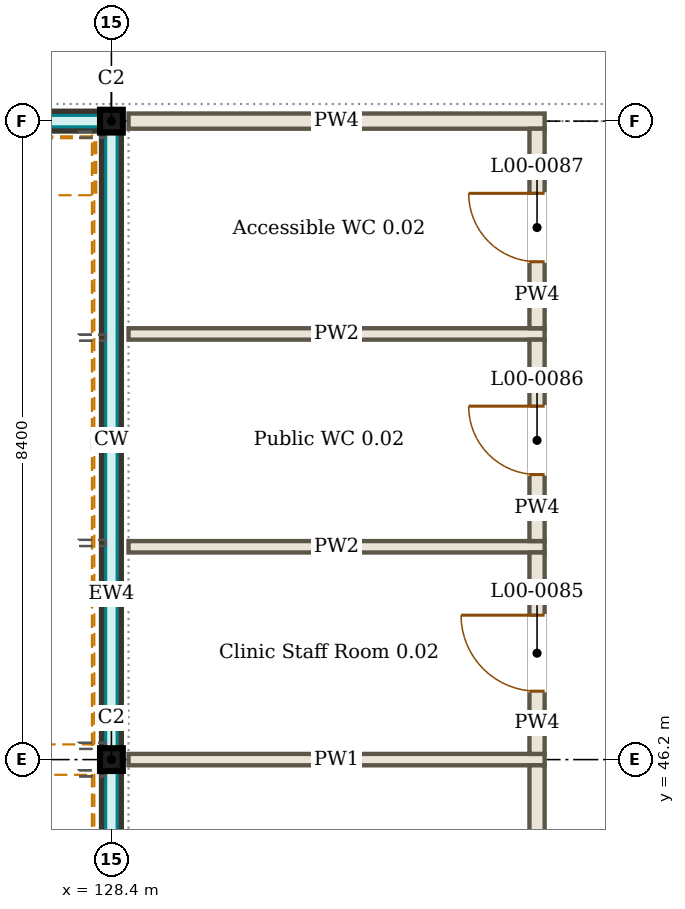
"""IFC4 building model, lengths in metres.
Left out: names, types, materials, properties, quantities, classifications, styles, units other than length and angle.
Written with IfcOpenShell. Run it as: python <this file> out.ifc"""

import sys

from ifc_helpers import new_model, si_unit, direction, frame, frame_2d, origin, origin_2d, place, context, subcontext, project, spatial, rectangle, i_section, extrude, element, fill, save


model = new_model("IFC4")
c1 = context("Model", 3, precision=1e-05, world=origin(), true_north=direction((0.0, 1.0)))
c2 = subcontext(c1, "Body", "Model", "MODEL_VIEW")
j1 = project(units=[si_unit("LENGTHUNIT", "METRE"), si_unit("PLANEANGLEUNIT", "RADIAN")], contexts=[c1])
p1 = place(None, origin())
s1 = spatial("IfcSite", under=j1, at=p1, CompositionType="ELEMENT")
p2 = place(p1, origin())
s2 = spatial("IfcBuilding", under=s1, at=p2, CompositionType="ELEMENT")
p3 = place(p2, origin())
s3 = spatial("IfcBuildingStorey", under=s2, at=p3, CompositionType="ELEMENT", Elevation=0.0)
for number, where, z_axis, x_axis in (
    (1, (128.4, 46.2, 0.0), (0.0, 0.0, 1.0), (1.0, 0.0, 0.0)),
    (2, (128.4, 54.6, 0.0), (0.0, 0.0, 1.0), (1.0, 0.0, 0.0)),
):
    element("IfcColumn", number, at=place(p3, frame(where, z_axis=z_axis, x_axis=x_axis)), inside=s3, PredefinedType="COLUMN", context=c2, shape_type="SweptSolid", body=[
        extrude(i_section(OverallWidth=0.3, OverallDepth=0.3, WebThickness=0.011, FlangeThickness=0.019, FilletRadius=0.027, at=origin_2d()), origin(), (0.0, 0.0, 1.0), 4.5),
    ])
p4 = place(p3, frame((120.15, 54.6, 0.0), z_axis=(0.0, 0.0, 1.0), x_axis=(1.0, 0.0, 0.0)))
e3 = element("IfcWall", 3, at=p4, inside=s3, PredefinedType="SOLIDWALL", context=c2, shape_type="SweptSolid", body=[
    extrude(rectangle(XDim=8.1, YDim=0.25, at=frame_2d((4.05, 0.0))), origin(), (0.0, 0.0, 1.0), 0.45),
])
p5 = place(p3, frame((120.15, 54.44, 3.82), z_axis=(0.0, 0.0, 1.0), x_axis=(1.0, 0.0, 0.0)))
e4 = element("IfcWall", 4, at=p5, inside=s3, PredefinedType="SOLIDWALL", context=c2, shape_type="SweptSolid", body=[
    extrude(rectangle(XDim=8.1, YDim=0.13, at=frame_2d((4.05, 0.0))), origin(), (0.0, 0.0, 1.0), 0.68),
])
p6 = place(p3, frame((128.4, 37.95, 0.0), z_axis=(0.0, 0.0, 1.0), x_axis=(0.0, 1.0, 0.0)))
e5 = element("IfcWall", 5, at=p6, inside=s3, PredefinedType="SOLIDWALL", context=c2, shape_type="SweptSolid", body=[
    extrude(rectangle(XDim=8.1, YDim=0.25, at=frame_2d((4.05, 0.0))), origin(), (0.0, 0.0, 1.0), 0.45),
])
p7 = place(p3, frame((128.24, 37.95, 3.82), z_axis=(0.0, 0.0, 1.0), x_axis=(0.0, 1.0, 0.0)))
e6 = element("IfcWall", 6, at=p7, inside=s3, PredefinedType="SOLIDWALL", context=c2, shape_type="SweptSolid", body=[
    extrude(rectangle(XDim=8.1, YDim=0.13, at=frame_2d((4.05, 0.0))), origin(), (0.0, 0.0, 1.0), 0.68),
])
p8 = place(p3, frame((128.4, 46.35, 0.0), z_axis=(0.0, 0.0, 1.0), x_axis=(0.0, 1.0, 0.0)))
e7 = element("IfcWall", 7, at=p8, inside=s3, PredefinedType="SOLIDWALL", context=c2, shape_type="SweptSolid", body=[
    extrude(rectangle(XDim=8.1, YDim=0.25, at=frame_2d((4.05, 0.0))), origin(), (0.0, 0.0, 1.0), 0.45),
])
p9 = place(p3, frame((128.24, 46.35, 3.82), z_axis=(0.0, 0.0, 1.0), x_axis=(0.0, 1.0, 0.0)))
e8 = element("IfcWall", 8, at=p9, inside=s3, PredefinedType="SOLIDWALL", context=c2, shape_type="SweptSolid", body=[
    extrude(rectangle(XDim=8.1, YDim=0.13, at=frame_2d((4.05, 0.0))), origin(), (0.0, 0.0, 1.0), 0.68),
])
p10 = place(p3, frame((128.625, 46.2, 0.0), z_axis=(0.0, 0.0, 1.0), x_axis=(1.0, 0.0, 0.0)))
e9 = element("IfcWall", 9, at=p10, inside=s3, PredefinedType="PARTITIONING", context=c2, shape_type="SweptSolid", body=[
    extrude(rectangle(XDim=5.475, YDim=0.15, at=frame_2d((2.738, 0.0))), origin(), (0.0, 0.0, 1.0), 3.8),
])
for number, where, z_axis, x_axis in (
    (10, (128.625, 49.0, 0.0), (0.0, 0.0, 1.0), (1.0, 0.0, 0.0)),
    (11, (128.625, 51.8, 0.0), (0.0, 0.0, 1.0), (1.0, 0.0, 0.0)),
):
    element("IfcWall", number, at=place(p3, frame(where, z_axis=z_axis, x_axis=x_axis)), inside=s3, PredefinedType="PARTITIONING", context=c2, shape_type="SweptSolid", body=[
        extrude(rectangle(XDim=5.475, YDim=0.15, at=frame_2d((2.738, 0.0))), origin(), (0.0, 0.0, 1.0), 3.95),
    ])
p11 = place(p3, frame((128.625, 54.6, 0.0), z_axis=(0.0, 0.0, 1.0), x_axis=(1.0, 0.0, 0.0)))
e12 = element("IfcWall", 12, at=p11, inside=s3, PredefinedType="PARTITIONING", context=c2, shape_type="SweptSolid", body=[
    extrude(rectangle(XDim=5.475, YDim=0.2, at=frame_2d((2.738, 0.0))), origin(), (0.0, 0.0, 1.0), 3.8),
])
p12 = place(p3, frame((134.0, 37.9, 0.0), z_axis=(0.0, 0.0, 1.0), x_axis=(0.0, 1.0, 0.0)))
e13 = element("IfcWall", 13, at=p12, inside=s3, PredefinedType="PARTITIONING", context=c2, shape_type="SweptSolid", body=[
    extrude(rectangle(XDim=8.225, YDim=0.2, at=frame_2d((4.113, 0.0))), origin(), (0.0, 0.0, 1.0), 3.8),
])
p13 = place(p12, frame((3.6, 0.0, 0.0)))
e14 = element("IfcOpeningElement", 14, at=p13, cuts=e13, PredefinedType="OPENING", context=c2, shape_type="SweptSolid", body=[
    extrude(rectangle(XDim=1.0, YDim=2.1, at=frame_2d((0.5, 1.05))), frame((0.0, 0.11, 0.0), z_axis=(0.0, -1.0, 0.0), x_axis=(1.0, 0.0, 0.0)), (0.0, 0.0, 1.0), 0.22),
])
p14 = place(p3, frame((134.0, 46.275, 0.0), z_axis=(0.0, 0.0, 1.0), x_axis=(0.0, 1.0, 0.0)))
e15 = element("IfcWall", 15, at=p14, inside=s3, PredefinedType="PARTITIONING", context=c2, shape_type="SweptSolid", body=[
    extrude(rectangle(XDim=2.65, YDim=0.2, at=frame_2d((1.325, 0.0))), origin(), (0.0, 0.0, 1.0), 3.8),
])
p15 = place(p14, frame((0.825, 0.0, 0.0)))
e16 = element("IfcOpeningElement", 16, at=p15, cuts=e15, PredefinedType="OPENING", context=c2, shape_type="SweptSolid", body=[
    extrude(rectangle(XDim=1.0, YDim=2.1, at=frame_2d((0.5, 1.05))), frame((0.0, 0.11, 0.0), z_axis=(0.0, -1.0, 0.0), x_axis=(1.0, 0.0, 0.0)), (0.0, 0.0, 1.0), 0.22),
])
p16 = place(p3, frame((134.0, 49.075, 0.0), z_axis=(0.0, 0.0, 1.0), x_axis=(0.0, 1.0, 0.0)))
e17 = element("IfcWall", 17, at=p16, inside=s3, PredefinedType="PARTITIONING", context=c2, shape_type="SweptSolid", body=[
    extrude(rectangle(XDim=2.65, YDim=0.2, at=frame_2d((1.325, 0.0))), origin(), (0.0, 0.0, 1.0), 3.95),
])
p17 = place(p16, frame((0.875, 0.0, 0.0)))
e18 = element("IfcOpeningElement", 18, at=p17, cuts=e17, PredefinedType="OPENING", context=c2, shape_type="SweptSolid", body=[
    extrude(rectangle(XDim=0.9, YDim=2.1, at=frame_2d((0.45, 1.05))), frame((0.0, 0.11, 0.0), z_axis=(0.0, -1.0, 0.0), x_axis=(1.0, 0.0, 0.0)), (0.0, 0.0, 1.0), 0.22),
])
p18 = place(p3, frame((134.0, 51.875, 0.0), z_axis=(0.0, 0.0, 1.0), x_axis=(0.0, 1.0, 0.0)))
e19 = element("IfcWall", 19, at=p18, inside=s3, PredefinedType="PARTITIONING", context=c2, shape_type="SweptSolid", body=[
    extrude(rectangle(XDim=2.625, YDim=0.2, at=frame_2d((1.312, 0.0))), origin(), (0.0, 0.0, 1.0), 3.8),
])
p19 = place(p18, frame((0.875, 0.0, 0.0)))
e20 = element("IfcOpeningElement", 20, at=p19, cuts=e19, PredefinedType="OPENING", context=c2, shape_type="SweptSolid", body=[
    extrude(rectangle(XDim=0.9, YDim=2.1, at=frame_2d((0.45, 1.05))), frame((0.0, 0.11, 0.0), z_axis=(0.0, -1.0, 0.0), x_axis=(1.0, 0.0, 0.0)), (0.0, 0.0, 1.0), 0.22),
])
p20 = place(p15, origin())
e21 = element("IfcDoor", 21, at=p20, inside=s3, OperationType="SINGLE_SWING_RIGHT", PredefinedType="DOOR", context=c2, shape_type="SweptSolid", body=[
    extrude(rectangle(XDim=1.0, YDim=2.1, at=frame_2d((0.5, 1.05))), frame((0.0, 0.025, 0.0), z_axis=(0.0, -1.0, 0.0), x_axis=(1.0, 0.0, 0.0)), (0.0, 0.0, 1.0), 0.05),
])
fill(e16, e21)
p21 = place(p17, origin())
e22 = element("IfcDoor", 22, at=p21, inside=s3, OperationType="SINGLE_SWING_RIGHT", PredefinedType="DOOR", context=c2, shape_type="SweptSolid", body=[
    extrude(rectangle(XDim=0.9, YDim=2.1, at=frame_2d((0.45, 1.05))), frame((0.0, 0.025, 0.0), z_axis=(0.0, -1.0, 0.0), x_axis=(1.0, 0.0, 0.0)), (0.0, 0.0, 1.0), 0.05),
])
fill(e18, e22)
p22 = place(p19, origin())
e23 = element("IfcDoor", 23, at=p22, inside=s3, OperationType="SINGLE_SWING_RIGHT", PredefinedType="DOOR", context=c2, shape_type="SweptSolid", body=[
    extrude(rectangle(XDim=0.9, YDim=2.1, at=frame_2d((0.45, 1.05))), frame((0.0, 0.025, 0.0), z_axis=(0.0, -1.0, 0.0), x_axis=(1.0, 0.0, 0.0)), (0.0, 0.0, 1.0), 0.05),
])
fill(e20, e23)
save(model, sys.argv[1])
